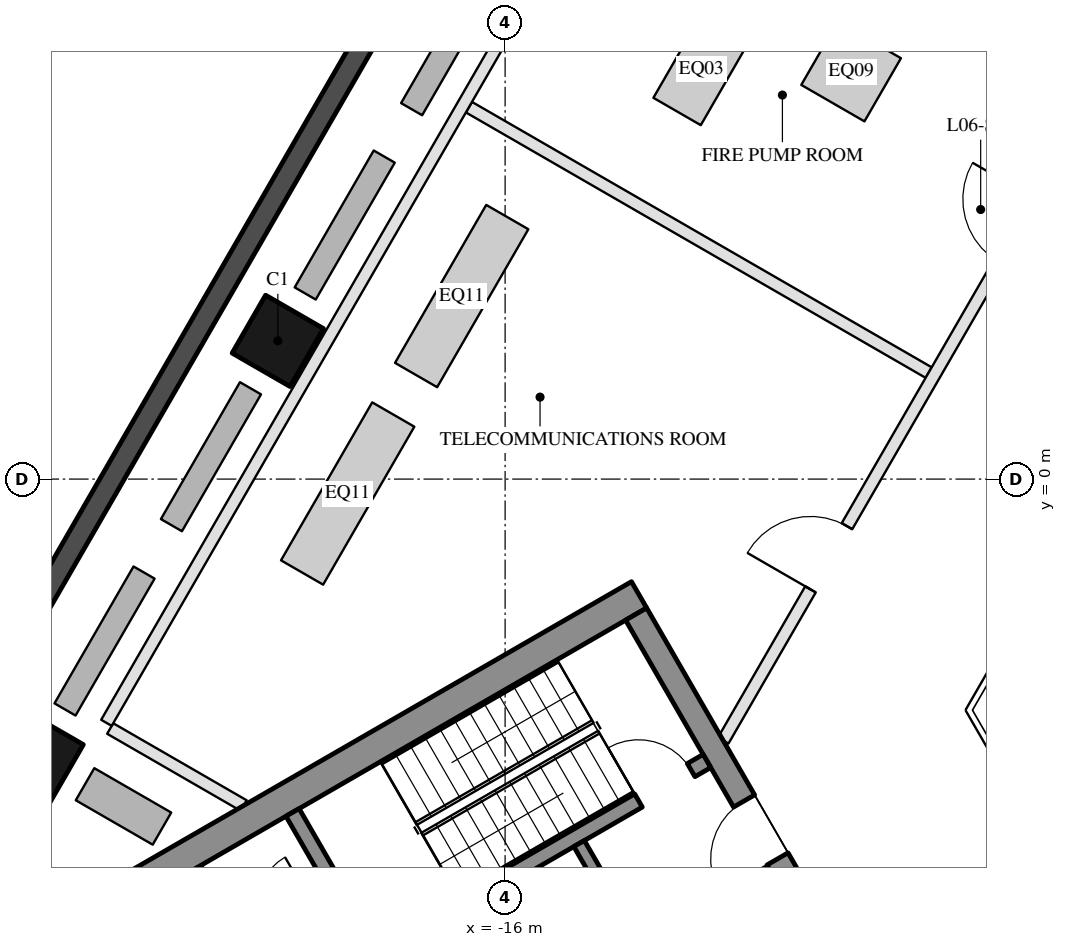
"""IFC4 building model, lengths in metres.
Left out: names, types, materials, properties, quantities, classifications, styles, units other than length and angle.
Written with IfcOpenShell. Run it as: python <this file> out.ifc"""

import sys

from ifc_helpers import new_model, si_unit, direction, frame, frame_2d, origin, origin_2d, place, context, subcontext, project, spatial, rectangle, hollow_rectangle, extrude, boolean, halfspace, element, fill, save


model = new_model("IFC4")
c1 = context("Model", 3, precision=1e-05, world=origin(), true_north=direction((0.0, 1.0)))
c2 = subcontext(c1, "Body", "Model", "MODEL_VIEW")
j1 = project(units=[si_unit("LENGTHUNIT", "METRE"), si_unit("PLANEANGLEUNIT", "RADIAN")], contexts=[c1])
p1 = place(None, origin())
s1 = spatial("IfcSite", under=j1, at=p1, CompositionType="ELEMENT")
p2 = place(p1, origin())
s2 = spatial("IfcBuilding", under=s1, at=p2, CompositionType="ELEMENT")
p3 = place(p2, frame((0.0, 0.0, 37.5)))
s3 = spatial("IfcBuildingStorey", under=s2, at=p3, CompositionType="ELEMENT", Elevation=37.5)
p4 = place(p3, frame((-19.738, 2.273, 0.0), z_axis=(0.0, 0.0, 1.0), x_axis=(0.5, 0.866025403784, 0.0)))
e1 = element("IfcColumn", 1, at=p4, inside=s3, PredefinedType="COLUMN", context=c2, shape_type="SweptSolid", body=[
    boolean("DIFFERENCE", extrude(hollow_rectangle(XDim=1.1, YDim=1.1, WallThickness=0.05, at=origin_2d()), origin(), (0.0, 0.0, 1.0), 4.5), halfspace(frame((0.0, 0.0, 0.006), z_axis=(0.0, 0.0, 1.0), x_axis=(1.0, 0.0, 0.0)), True)),
])
p5 = place(p3, frame((-23.688, -4.568, 0.0), z_axis=(0.0, 0.0, 1.0), x_axis=(0.5, 0.866025403784, 0.0)))
e2 = element("IfcColumn", 2, at=p5, inside=s3, PredefinedType="COLUMN", context=c2, shape_type="SweptSolid", body=[
    boolean("DIFFERENCE", extrude(hollow_rectangle(XDim=1.1, YDim=1.1, WallThickness=0.05, at=origin_2d()), origin(), (0.0, 0.0, 1.0), 4.5), halfspace(frame((0.0, 0.0, 0.007), z_axis=(0.0, 0.0, 1.0), x_axis=(1.0, 0.0, 0.0)), True)),
])
p6 = place(p3, frame((-7.441, 26.022, 0.0), z_axis=(0.0, 0.0, 1.0), x_axis=(-0.499998380999, -0.866026338513, 0.0)))
e3 = element("IfcWall", 3, at=p6, inside=s3, PredefinedType="SOLIDWALL", context=c2, shape_type="SweptSolid", body=[
    extrude(rectangle(XDim=37.631, YDim=0.35, at=frame_2d((18.816, 0.0))), origin(), (0.0, 0.0, 1.0), 4.2),
])
p7 = place(p3, frame((-13.797, -1.903, 0.0), z_axis=(0.0, 0.0, 1.0), x_axis=(-0.866025009528, -0.500000682871, 0.0)))
e4 = element("IfcWall", 4, at=p7, inside=s3, PredefinedType="SHEAR", context=c2, shape_type="SweptSolid", body=[
    extrude(rectangle(XDim=14.837, YDim=0.5, at=frame_2d((7.418, 0.0))), origin(), (0.0, 0.0, 1.0), 4.2),
])
p8 = place(p3, frame((-13.845, -2.22, 0.0), z_axis=(0.0, 0.0, 1.0), x_axis=(0.500004234368, -0.866022959057, 0.0)))
e5 = element("IfcWall", 5, at=p8, inside=s3, PredefinedType="SHEAR", context=c2, shape_type="SweptSolid", body=[
    extrude(rectangle(XDim=10.0, YDim=0.4, at=frame_2d((5.0, 0.0))), origin(), (0.0, 0.0, 1.0), 4.2),
])
p9 = place(p8, frame((3.55, 0.0, 0.0)))
e6 = element("IfcOpeningElement", 6, at=p9, cuts=e5, PredefinedType="OPENING", context=c2, shape_type="SweptSolid", body=[
    extrude(rectangle(XDim=1.1, YDim=2.1, at=frame_2d((0.55, 1.05))), frame((0.0, 0.21, 0.0), z_axis=(0.0, -1.0, 0.0), x_axis=(1.0, 0.0, 0.0)), (0.0, 0.0, 1.0), 0.42),
])
p10 = place(p8, frame((5.85, 0.0, 0.0)))
e7 = element("IfcOpeningElement", 7, at=p10, cuts=e5, PredefinedType="OPENING", context=c2, shape_type="SweptSolid", body=[
    extrude(rectangle(XDim=1.4, YDim=2.1, at=frame_2d((0.7, 1.05))), frame((0.0, 0.21, 0.0), z_axis=(0.0, -1.0, 0.0), x_axis=(1.0, 0.0, 0.0)), (0.0, 0.0, 1.0), 0.42),
])
p11 = place(p3, frame((-12.681, -4.636, 0.0), z_axis=(0.0, 0.0, 1.0), x_axis=(-0.866021702275, -0.500006411147, 0.0)))
e8 = element("IfcWall", 8, at=p11, inside=s3, PredefinedType="SHEAR", context=c2, shape_type="SweptSolid", body=[
    extrude(rectangle(XDim=6.45, YDim=0.25, at=frame_2d((3.225, 0.0))), origin(), (0.0, 0.0, 1.0), 4.2),
])
p12 = place(p11, frame((0.3, 0.0, 0.0)))
e9 = element("IfcOpeningElement", 9, at=p12, cuts=e8, PredefinedType="OPENING", context=c2, shape_type="SweptSolid", body=[
    extrude(rectangle(XDim=1.0, YDim=2.1, at=frame_2d((0.5, 1.05))), frame((0.0, 0.135, 0.0), z_axis=(0.0, -1.0, 0.0), x_axis=(1.0, 0.0, 0.0)), (0.0, 0.0, 1.0), 0.27),
])
p13 = place(p3, frame((-19.496, -5.482, 0.0), z_axis=(0.0, 0.0, 1.0), x_axis=(0.499990435942, -0.866030925526, 0.0)))
e10 = element("IfcWall", 10, at=p13, inside=s3, PredefinedType="SHEAR", context=c2, shape_type="SweptSolid", body=[
    extrude(rectangle(XDim=2.55, YDim=0.25, at=frame_2d((1.275, 0.0))), origin(), (0.0, 0.0, 1.0), 4.2),
])
p14 = place(p3, frame((-14.783, -5.995, 0.0), z_axis=(0.0, 0.0, 1.0), x_axis=(0.49994636267, -0.866056369097, 0.0)))
e11 = element("IfcWall", 11, at=p14, inside=s3, PredefinedType="SHEAR", context=c2, shape_type="SweptSolid", body=[
    extrude(rectangle(XDim=2.8, YDim=0.2, at=frame_2d((1.4, 0.0))), origin(), (0.0, 0.0, 1.0), 4.2),
])
p15 = place(p14, frame((0.7, 0.0, 0.0)))
e12 = element("IfcOpeningElement", 12, at=p15, cuts=e11, PredefinedType="OPENING", context=c2, shape_type="SweptSolid", body=[
    extrude(rectangle(XDim=1.2, YDim=2.1, at=frame_2d((0.6, 1.05))), frame((0.0, 0.11, 0.0), z_axis=(0.0, -1.0, 0.0), x_axis=(1.0, 0.0, 0.0)), (0.0, 0.0, 1.0), 0.22),
])
p16 = place(p3, frame((-21.076, -6.395, 0.0), z_axis=(0.0, 0.0, 1.0), x_axis=(0.50001468107, -0.866016927499, 0.0)))
e13 = element("IfcWall", 13, at=p16, inside=s3, PredefinedType="PARTITIONING", context=c2, shape_type="SweptSolid", body=[
    extrude(rectangle(XDim=5.4, YDim=0.2, at=frame_2d((2.7, 0.0))), origin(), (0.0, 0.0, 1.0), 4.2),
])
p17 = place(p16, frame((2.163, 0.0, 0.0)))
e14 = element("IfcOpeningElement", 14, at=p17, cuts=e13, PredefinedType="OPENING", context=c2, shape_type="SweptSolid", body=[
    extrude(rectangle(XDim=0.9, YDim=2.1, at=frame_2d((0.45, 1.05))), frame((0.0, 0.11, 0.0), z_axis=(0.0, -1.0, 0.0), x_axis=(1.0, 0.0, 0.0)), (0.0, 0.0, 1.0), 0.22),
])
p18 = place(p16, frame((4.038, 0.0, 0.0)))
e15 = element("IfcOpeningElement", 15, at=p18, cuts=e13, PredefinedType="OPENING", context=c2, shape_type="SweptSolid", body=[
    extrude(rectangle(XDim=0.9, YDim=2.1, at=frame_2d((0.45, 1.05))), frame((0.0, 0.11, 0.0), z_axis=(0.0, -1.0, 0.0), x_axis=(1.0, 0.0, 0.0)), (0.0, 0.0, 1.0), 0.22),
])
for number, where, z_axis, x_axis in (
    (16, (-13.845, 10.88, 0.0), (0.0, 0.0, 1.0), (0.866, -0.5, 0.0)),
    (17, (-16.595, 6.117, 0.0), (0.0, 0.0, 1.0), (0.866, -0.5, 0.0)),
):
    element("IfcWall", number, at=place(p3, frame(where, z_axis=z_axis, x_axis=x_axis)), inside=s3, PredefinedType="PARTITIONING", context=c2, shape_type="SweptSolid", body=[
        extrude(rectangle(XDim=8.73, YDim=0.2, at=frame_2d((4.365, 0.0))), origin(), (0.0, 0.0, 1.0), 4.2),
    ])
p19 = place(p3, frame((-22.495, -4.102, 0.0), z_axis=(0.0, 0.0, 1.0), x_axis=(0.866065287345, -0.499930913282, 0.0)))
e18 = element("IfcWall", 18, at=p19, inside=s3, PredefinedType="PARTITIONING", context=c2, shape_type="SweptSolid", body=[
    extrude(rectangle(XDim=2.534, YDim=0.2, at=frame_2d((1.267, 0.0))), origin(), (0.0, 0.0, 1.0), 4.2),
])
p20 = place(p3, frame((-7.806, 21.539, 0.0), z_axis=(0.0, 0.0, 1.0), x_axis=(-0.500002084189, -0.866024200474, 0.0)))
e19 = element("IfcWall", 19, at=p20, inside=s3, PredefinedType="PARTITIONING", context=c2, shape_type="SweptSolid", body=[
    extrude(rectangle(XDim=29.5, YDim=0.2, at=frame_2d((14.75, 0.0))), origin(), (0.0, 0.0, 1.0), 3.41),
])
p21 = place(p3, frame((-2.482, 12.9, 0.0), z_axis=(0.0, 0.0, 1.0), x_axis=(-0.50000478328, -0.866022642139, 0.0)))
e20 = element("IfcWall", 20, at=p21, inside=s3, PredefinedType="PARTITIONING", context=c2, shape_type="SweptSolid", body=[
    extrude(rectangle(XDim=19.861, YDim=0.2, at=frame_2d((9.931, 0.0))), origin(), (0.0, 0.0, 1.0), 3.41),
])
p22 = place(p21, frame((3.121, 0.0, 0.0)))
e21 = element("IfcOpeningElement", 21, at=p22, cuts=e20, PredefinedType="OPENING", context=c2, shape_type="SweptSolid", body=[
    extrude(rectangle(XDim=1.2, YDim=2.1, at=frame_2d((0.6, 1.05))), frame((0.0, 0.11, 0.0), z_axis=(0.0, -1.0, 0.0), x_axis=(1.0, 0.0, 0.0)), (0.0, 0.0, 1.0), 0.22),
])
p23 = place(p21, frame((9.581, 0.0, 0.0)))
e22 = element("IfcOpeningElement", 22, at=p23, cuts=e20, PredefinedType="OPENING", context=c2, shape_type="SweptSolid", body=[
    extrude(rectangle(XDim=1.2, YDim=2.1, at=frame_2d((0.6, 1.05))), frame((0.0, 0.11, 0.0), z_axis=(0.0, -1.0, 0.0), x_axis=(1.0, 0.0, 0.0)), (0.0, 0.0, 1.0), 0.22),
])
p24 = place(p21, frame((15.79, 0.0, 0.0)))
e23 = element("IfcOpeningElement", 23, at=p24, cuts=e20, PredefinedType="OPENING", context=c2, shape_type="SweptSolid", body=[
    extrude(rectangle(XDim=1.2, YDim=2.1, at=frame_2d((0.6, 1.05))), frame((0.0, 0.11, 0.0), z_axis=(0.0, -1.0, 0.0), x_axis=(1.0, 0.0, 0.0)), (0.0, 0.0, 1.0), 0.22),
])
p25 = place(p9, frame((1.1, 0.0, 0.0), z_axis=(0.0, 0.0, 1.0), x_axis=(-1.0, 0.0, 0.0)))
e24 = element("IfcDoor", 24, at=p25, inside=s3, OperationType="SINGLE_SWING_LEFT", PredefinedType="DOOR", context=c2, shape_type="SweptSolid", body=[
    extrude(rectangle(XDim=1.1, YDim=2.1, at=frame_2d((0.55, 1.05))), frame((0.0, 0.025, 0.0), z_axis=(0.0, -1.0, 0.0), x_axis=(1.0, 0.0, 0.0)), (0.0, 0.0, 1.0), 0.05),
])
fill(e6, e24)
p26 = place(p12, frame((1.0, 0.0, 0.0), z_axis=(0.0, 0.0, 1.0), x_axis=(-1.0, 0.0, 0.0)))
e25 = element("IfcDoor", 25, at=p26, inside=s3, OperationType="SINGLE_SWING_LEFT", PredefinedType="DOOR", context=c2, shape_type="SweptSolid", body=[
    extrude(rectangle(XDim=1.0, YDim=2.1, at=frame_2d((0.5, 1.05))), frame((0.0, 0.025, 0.0), z_axis=(0.0, -1.0, 0.0), x_axis=(1.0, 0.0, 0.0)), (0.0, 0.0, 1.0), 0.05),
])
fill(e9, e25)
p27 = place(p24, frame((1.2, 0.0, 0.0), z_axis=(0.0, 0.0, 1.0), x_axis=(-1.0, 0.0, 0.0)))
e26 = element("IfcDoor", 26, at=p27, inside=s3, OperationType="SINGLE_SWING_LEFT", PredefinedType="DOOR", context=c2, shape_type="SweptSolid", body=[
    extrude(rectangle(XDim=1.2, YDim=2.1, at=frame_2d((0.6, 1.05))), frame((0.0, 0.025, 0.0), z_axis=(0.0, -1.0, 0.0), x_axis=(1.0, 0.0, 0.0)), (0.0, 0.0, 1.0), 0.05),
])
fill(e23, e26)
save(model, sys.argv[1])
